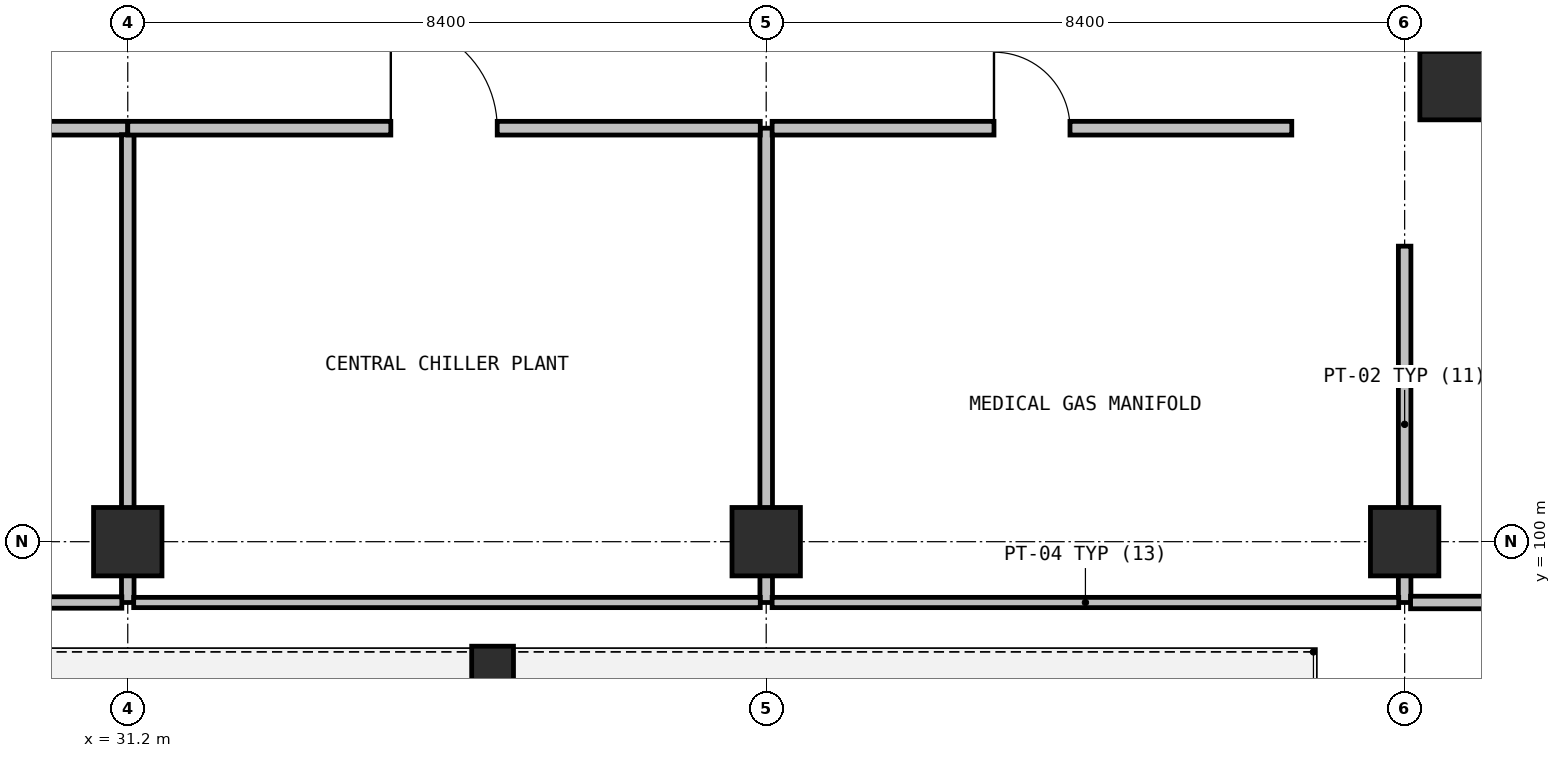
"""IFC4 building model, lengths in metres.
Left out: names, types, materials, properties, quantities, classifications, styles, units other than length and angle.
Written with IfcOpenShell. Run it as: python <this file> out.ifc"""

import sys

from ifc_helpers import new_model, si_unit, direction, frame, frame_2d, origin, origin_2d, place, context, subcontext, project, spatial, rectangle, extrude, element, fill, save


model = new_model("IFC4")
c1 = context("Model", 3, precision=1e-05, world=origin(), true_north=direction((0.0, 1.0)))
c2 = subcontext(c1, "Body", "Model", "MODEL_VIEW")
j1 = project(units=[si_unit("LENGTHUNIT", "METRE"), si_unit("PLANEANGLEUNIT", "RADIAN")], contexts=[c1])
p1 = place(None, origin())
s1 = spatial("IfcSite", under=j1, at=p1, CompositionType="ELEMENT")
p2 = place(p1, origin())
s2 = spatial("IfcBuilding", under=s1, at=p2, CompositionType="ELEMENT")
p3 = place(p2, frame((0.0, 0.0, -4.8)))
s3 = spatial("IfcBuildingStorey", under=s2, at=p3, CompositionType="ELEMENT", Elevation=-4.8)
p4 = place(p3, frame((48.65, 106.0, 0.0), z_axis=(0.0, 0.0, 1.0), x_axis=(1.0, 0.0, 0.0)))
e1 = element("IfcColumn", 1, at=p4, inside=s3, PredefinedType="COLUMN", context=c2, shape_type="SweptSolid", body=[
    extrude(rectangle(XDim=0.9, YDim=0.9, at=origin_2d()), origin(), (0.0, 0.0, 1.0), 4.8),
])
p5 = place(p3, frame((36.0, 98.35, 0.0), z_axis=(0.0, 0.0, 1.0), x_axis=(1.0, 0.0, 0.0)))
e2 = element("IfcColumn", 2, at=p5, inside=s3, PredefinedType="COLUMN", context=c2, shape_type="SweptSolid", body=[
    extrude(rectangle(XDim=0.55, YDim=0.55, at=origin_2d()), origin(), (0.0, 0.0, 1.0), 1.347),
])
for number, where, z_axis, x_axis in (
    (3, (31.2, 100.0, 0.0), (0.0, 0.0, 1.0), (1.0, 0.0, 0.0)),
    (4, (39.6, 100.0, 0.0), (0.0, 0.0, 1.0), (1.0, 0.0, 0.0)),
    (5, (48.0, 100.0, 0.0), (0.0, 0.0, 1.0), (1.0, 0.0, 0.0)),
):
    element("IfcColumn", number, at=place(p3, frame(where, z_axis=z_axis, x_axis=x_axis)), inside=s3, PredefinedType="COLUMN", context=c2, shape_type="SweptSolid", body=[
        extrude(rectangle(XDim=0.9, YDim=0.9, at=origin_2d()), origin(), (0.0, 0.0, 1.0), 4.8),
    ])
p6 = place(p3, frame((24.766, 105.44, 0.0), z_axis=(0.0, 0.0, 1.0), x_axis=(1.0, 0.0, 0.0)))
e6 = element("IfcWall", 6, at=p6, inside=s3, PredefinedType="PARTITIONING", context=c2, shape_type="SweptSolid", body=[
    extrude(rectangle(XDim=6.434, YDim=0.18, at=frame_2d((3.217, 0.0))), origin(), (0.0, 0.0, 1.0), 4.45),
])
p7 = place(p6, frame((2.567, 0.0, 0.0)))
e7 = element("IfcOpeningElement", 7, at=p7, cuts=e6, PredefinedType="OPENING", context=c2, shape_type="SweptSolid", body=[
    extrude(rectangle(XDim=1.3, YDim=2.15, at=frame_2d((0.65, 1.075))), frame((0.0, 0.1, 0.0), z_axis=(0.0, -1.0, 0.0), x_axis=(1.0, 0.0, 0.0)), (0.0, 0.0, 1.0), 0.2),
])
p8 = place(p3, frame((31.2, 105.354, 0.0), z_axis=(0.0, 0.0, 1.0), x_axis=(0.0, -1.0, 0.0)))
e8 = element("IfcWall", 8, at=p8, inside=s3, PredefinedType="PARTITIONING", context=c2, shape_type="SweptSolid", body=[
    extrude(rectangle(XDim=6.154, YDim=0.165, at=frame_2d((3.077, 0.0))), origin(), (0.0, 0.0, 1.0), 3.7),
])
p9 = place(p3, frame((31.122, 99.2, 0.0), z_axis=(0.0, 0.0, 1.0), x_axis=(-1.0, 0.0, 0.0)))
e9 = element("IfcWall", 9, at=p9, inside=s3, PredefinedType="PARTITIONING", context=c2, shape_type="SweptSolid", body=[
    extrude(rectangle(XDim=6.264, YDim=0.15, at=frame_2d((3.132, 0.0))), origin(), (0.0, 0.0, 1.0), 4.45),
])
p10 = place(p3, frame((39.6, 105.44, 0.0), z_axis=(0.0, 0.0, 1.0), x_axis=(0.0, -1.0, 0.0)))
e10 = element("IfcWall", 10, at=p10, inside=s3, PredefinedType="PARTITIONING", context=c2, shape_type="SweptSolid", body=[
    extrude(rectangle(XDim=6.24, YDim=0.165, at=frame_2d((3.12, 0.0))), origin(), (0.0, 0.0, 1.0), 3.7),
])
p11 = place(p3, frame((39.522, 99.2, 0.0), z_axis=(0.0, 0.0, 1.0), x_axis=(-1.0, 0.0, 0.0)))
e11 = element("IfcWall", 11, at=p11, inside=s3, PredefinedType="PARTITIONING", context=c2, shape_type="SweptSolid", body=[
    extrude(rectangle(XDim=8.244, YDim=0.135, at=frame_2d((4.122, 0.0))), origin(), (0.0, 0.0, 1.0), 4.45),
])
p12 = place(p3, frame((31.2, 105.44, 0.0), z_axis=(0.0, 0.0, 1.0), x_axis=(1.0, 0.0, 0.0)))
e12 = element("IfcWall", 12, at=p12, inside=s3, PredefinedType="PARTITIONING", context=c2, shape_type="SweptSolid", body=[
    extrude(rectangle(XDim=8.322, YDim=0.18, at=frame_2d((4.161, 0.0))), origin(), (0.0, 0.0, 1.0), 4.45),
])
p13 = place(p12, frame((3.461, 0.0, 0.0)))
e13 = element("IfcOpeningElement", 13, at=p13, cuts=e12, PredefinedType="OPENING", context=c2, shape_type="SweptSolid", body=[
    extrude(rectangle(XDim=1.4, YDim=2.15, at=frame_2d((0.7, 1.075))), frame((0.0, 0.1, 0.0), z_axis=(0.0, -1.0, 0.0), x_axis=(1.0, 0.0, 0.0)), (0.0, 0.0, 1.0), 0.2),
])
p14 = place(p3, frame((48.0, 103.888, 0.0), z_axis=(0.0, 0.0, 1.0), x_axis=(0.0, -1.0, 0.0)))
e14 = element("IfcWall", 14, at=p14, inside=s3, PredefinedType="PARTITIONING", context=c2, shape_type="SweptSolid", body=[
    extrude(rectangle(XDim=4.688, YDim=0.165, at=frame_2d((2.344, 0.0))), origin(), (0.0, 0.0, 1.0), 3.7),
])
p15 = place(p3, frame((47.922, 99.2, 0.0), z_axis=(0.0, 0.0, 1.0), x_axis=(-1.0, 0.0, 0.0)))
e15 = element("IfcWall", 15, at=p15, inside=s3, PredefinedType="PARTITIONING", context=c2, shape_type="SweptSolid", body=[
    extrude(rectangle(XDim=8.244, YDim=0.135, at=frame_2d((4.122, 0.0))), origin(), (0.0, 0.0, 1.0), 4.45),
])
p16 = place(p3, frame((39.678, 105.44, 0.0), z_axis=(0.0, 0.0, 1.0), x_axis=(1.0, 0.0, 0.0)))
e16 = element("IfcWall", 16, at=p16, inside=s3, PredefinedType="PARTITIONING", context=c2, shape_type="SweptSolid", body=[
    extrude(rectangle(XDim=6.837, YDim=0.18, at=frame_2d((3.418, 0.0))), origin(), (0.0, 0.0, 1.0), 4.45),
])
p17 = place(p16, frame((2.919, 0.0, 0.0)))
e17 = element("IfcOpeningElement", 17, at=p17, cuts=e16, PredefinedType="OPENING", context=c2, shape_type="SweptSolid", body=[
    extrude(rectangle(XDim=1.0, YDim=2.15, at=frame_2d((0.5, 1.075))), frame((0.0, 0.1, 0.0), z_axis=(0.0, -1.0, 0.0), x_axis=(1.0, 0.0, 0.0)), (0.0, 0.0, 1.0), 0.2),
])
p18 = place(p3, frame((53.314, 99.2, 0.0), z_axis=(0.0, 0.0, 1.0), x_axis=(-1.0, 0.0, 0.0)))
e18 = element("IfcWall", 18, at=p18, inside=s3, PredefinedType="PARTITIONING", context=c2, shape_type="SweptSolid", body=[
    extrude(rectangle(XDim=5.236, YDim=0.165, at=frame_2d((2.618, 0.0))), origin(), (0.0, 0.0, 1.0), 4.45),
])
p19 = place(p13, origin())
e19 = element("IfcDoor", 19, at=p19, inside=s3, OperationType="SINGLE_SWING_RIGHT", PredefinedType="DOOR", context=c2, shape_type="SweptSolid", body=[
    extrude(rectangle(XDim=1.4, YDim=2.15, at=frame_2d((0.7, 1.075))), frame((0.0, 0.025, 0.0), z_axis=(0.0, -1.0, 0.0), x_axis=(1.0, 0.0, 0.0)), (0.0, 0.0, 1.0), 0.05),
])
fill(e13, e19)
p20 = place(p17, origin())
e20 = element("IfcDoor", 20, at=p20, inside=s3, OperationType="SINGLE_SWING_RIGHT", PredefinedType="DOOR", context=c2, shape_type="SweptSolid", body=[
    extrude(rectangle(XDim=1.0, YDim=2.15, at=frame_2d((0.5, 1.075))), frame((0.0, 0.025, 0.0), z_axis=(0.0, -1.0, 0.0), x_axis=(1.0, 0.0, 0.0)), (0.0, 0.0, 1.0), 0.05),
])
fill(e17, e20)
save(model, sys.argv[1])
